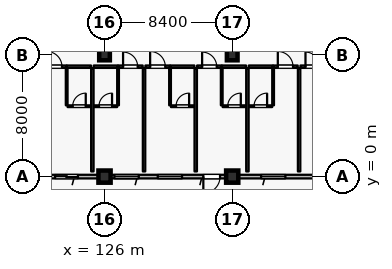
"""IFC4 building model, lengths in metres.
Left out: names, types, materials, properties, quantities, classifications, styles, units other than length and angle.
Written with IfcOpenShell. Run it as: python <this file> out.ifc"""

import sys

from ifc_helpers import new_model, si_unit, direction, frame, frame_2d, origin, origin_2d, place, context, subcontext, project, spatial, rectangle, extrude, element, fill, save


model = new_model("IFC4")
c1 = context("Model", 3, precision=1e-05, world=origin(), true_north=direction((0.0, 1.0)))
c2 = subcontext(c1, "Body", "Model", "MODEL_VIEW")
j1 = project(units=[si_unit("LENGTHUNIT", "METRE"), si_unit("PLANEANGLEUNIT", "RADIAN")], contexts=[c1])
p1 = place(None, origin())
s1 = spatial("IfcSite", under=j1, at=p1, CompositionType="ELEMENT")
p2 = place(p1, origin())
s2 = spatial("IfcBuilding", under=s1, at=p2, CompositionType="ELEMENT")
p3 = place(p2, frame((0.0, 0.0, 21.0)))
s3 = spatial("IfcBuildingStorey", under=s2, at=p3, CompositionType="ELEMENT", Elevation=21.0)
for number, where, z_axis, x_axis in (
    (1, (126.0, 0.0, 0.0), (0.0, 0.0, 1.0), (1.0, 0.0, 0.0)),
    (2, (134.4, 0.0, 0.0), (0.0, 0.0, 1.0), (1.0, 0.0, 0.0)),
):
    element("IfcColumn", number, at=place(p3, frame(where, z_axis=z_axis, x_axis=x_axis)), inside=s3, PredefinedType="COLUMN", context=c2, shape_type="SweptSolid", body=[
        extrude(rectangle(XDim=0.8, YDim=0.8, at=origin_2d()), origin(), (0.0, 0.0, 1.0), 4.2),
    ])
for number, where, z_axis, x_axis in (
    (3, (126.0, 8.0, 0.0), (0.0, 0.0, 1.0), (1.0, 0.0, 0.0)),
    (4, (134.4, 8.0, 0.0), (0.0, 0.0, 1.0), (1.0, 0.0, 0.0)),
):
    element("IfcColumn", number, at=place(p3, frame(where, z_axis=z_axis, x_axis=x_axis)), inside=s3, PredefinedType="COLUMN", context=c2, shape_type="SweptSolid", body=[
        extrude(rectangle(XDim=0.7, YDim=0.7, at=origin_2d()), origin(), (0.0, 0.0, 1.0), 4.2),
    ])
p4 = place(p3, frame((125.6, 0.0, 0.0), z_axis=(0.0, 0.0, 1.0), x_axis=(-1.0, 0.0, 0.0)))
e5 = element("IfcWall", 5, at=p4, inside=s3, PredefinedType="SOLIDWALL", context=c2, shape_type="SweptSolid", body=[
    extrude(rectangle(XDim=7.6, YDim=0.24, at=frame_2d((3.8, 0.0))), origin(), (0.0, 0.0, 1.0), 3.53),
])
p5 = place(p4, frame((1.35, 0.0, 0.0)))
e6 = element("IfcOpeningElement", 6, at=p5, cuts=e5, PredefinedType="OPENING", context=c2, shape_type="SweptSolid", body=[
    extrude(rectangle(XDim=1.5, YDim=2.25, at=frame_2d((0.75, 1.125))), frame((0.0, 0.13, 0.0), z_axis=(0.0, -1.0, 0.0), x_axis=(1.0, 0.0, 0.0)), (0.0, 0.0, 1.0), 0.26),
])
p6 = place(p4, frame((4.7, 0.0, 0.8)))
e7 = element("IfcOpeningElement", 7, at=p6, cuts=e5, PredefinedType="OPENING", context=c2, shape_type="SweptSolid", body=[
    extrude(rectangle(XDim=1.6, YDim=1.6, at=frame_2d((0.8, 0.8))), frame((0.0, 0.13, 0.0), z_axis=(0.0, -1.0, 0.0), x_axis=(1.0, 0.0, 0.0)), (0.0, 0.0, 1.0), 0.26),
])
p7 = place(p3, frame((134.0, 0.0, 0.0), z_axis=(0.0, 0.0, 1.0), x_axis=(-1.0, 0.0, 0.0)))
e8 = element("IfcWall", 8, at=p7, inside=s3, PredefinedType="SOLIDWALL", context=c2, shape_type="SweptSolid", body=[
    extrude(rectangle(XDim=7.6, YDim=0.24, at=frame_2d((3.8, 0.0))), origin(), (0.0, 0.0, 1.0), 3.53),
])
p8 = place(p7, frame((0.4, 0.0, 0.0)))
e9 = element("IfcOpeningElement", 9, at=p8, cuts=e8, PredefinedType="OPENING", context=c2, shape_type="SweptSolid", body=[
    extrude(rectangle(XDim=1.1, YDim=2.2, at=frame_2d((0.55, 1.1))), frame((0.0, 0.13, 0.0), z_axis=(0.0, -1.0, 0.0), x_axis=(1.0, 0.0, 0.0)), (0.0, 0.0, 1.0), 0.26),
])
p9 = place(p7, frame((2.9, 0.0, 0.8)))
e10 = element("IfcOpeningElement", 10, at=p9, cuts=e8, PredefinedType="OPENING", context=c2, shape_type="SweptSolid", body=[
    extrude(rectangle(XDim=1.6, YDim=1.6, at=frame_2d((0.8, 0.8))), frame((0.0, 0.13, 0.0), z_axis=(0.0, -1.0, 0.0), x_axis=(1.0, 0.0, 0.0)), (0.0, 0.0, 1.0), 0.26),
])
p10 = place(p7, frame((5.75, 0.0, 0.8)))
e11 = element("IfcOpeningElement", 11, at=p10, cuts=e8, PredefinedType="OPENING", context=c2, shape_type="SweptSolid", body=[
    extrude(rectangle(XDim=1.6, YDim=1.6, at=frame_2d((0.8, 0.8))), frame((0.0, 0.13, 0.0), z_axis=(0.0, -1.0, 0.0), x_axis=(1.0, 0.0, 0.0)), (0.0, 0.0, 1.0), 0.26),
])
p11 = place(p3, frame((142.4, 0.0, 0.0), z_axis=(0.0, 0.0, 1.0), x_axis=(-1.0, 0.0, 0.0)))
e12 = element("IfcWall", 12, at=p11, inside=s3, PredefinedType="SOLIDWALL", context=c2, shape_type="SweptSolid", body=[
    extrude(rectangle(XDim=7.6, YDim=0.24, at=frame_2d((3.8, 0.0))), origin(), (0.0, 0.0, 1.0), 3.53),
])
p12 = place(p11, frame((1.15, 0.0, 0.0)))
e13 = element("IfcOpeningElement", 13, at=p12, cuts=e12, PredefinedType="OPENING", context=c2, shape_type="SweptSolid", body=[
    extrude(rectangle(XDim=1.5, YDim=2.25, at=frame_2d((0.75, 1.125))), frame((0.0, 0.13, 0.0), z_axis=(0.0, -1.0, 0.0), x_axis=(1.0, 0.0, 0.0)), (0.0, 0.0, 1.0), 0.26),
])
p13 = place(p11, frame((4.5, 0.0, 0.8)))
e14 = element("IfcOpeningElement", 14, at=p13, cuts=e12, PredefinedType="OPENING", context=c2, shape_type="SweptSolid", body=[
    extrude(rectangle(XDim=1.6, YDim=1.6, at=frame_2d((0.8, 0.8))), frame((0.0, 0.13, 0.0), z_axis=(0.0, -1.0, 0.0), x_axis=(1.0, 0.0, 0.0)), (0.0, 0.0, 1.0), 0.26),
])
p14 = place(p3, frame((121.89, 7.23, 0.0), z_axis=(0.0, 0.0, 1.0), x_axis=(1.0, 0.0, 0.0)))
e15 = element("IfcWall", 15, at=p14, inside=s3, PredefinedType="PARTITIONING", context=c2, shape_type="SweptSolid", body=[
    extrude(rectangle(XDim=1.62, YDim=0.16, at=frame_2d((0.81, 0.0))), origin(), (0.0, 0.0, 1.0), 3.965),
])
p15 = place(p14, frame((0.31, 0.0, 0.0)))
e16 = element("IfcOpeningElement", 16, at=p15, cuts=e15, PredefinedType="OPENING", context=c2, shape_type="SweptSolid", body=[
    extrude(rectangle(XDim=1.0, YDim=2.25, at=frame_2d((0.5, 1.125))), frame((0.0, 0.09, 0.0), z_axis=(0.0, -1.0, 0.0), x_axis=(1.0, 0.0, 0.0)), (0.0, 0.0, 1.0), 0.18),
])
p16 = place(p3, frame((123.52, 7.23, 0.0), z_axis=(0.0, 0.0, 1.0), x_axis=(1.0, 0.0, 0.0)))
e17 = element("IfcWall", 17, at=p16, inside=s3, PredefinedType="PARTITIONING", context=c2, shape_type="SweptSolid", body=[
    extrude(rectangle(XDim=1.59, YDim=0.16, at=frame_2d((0.795, 0.0))), origin(), (0.0, 0.0, 1.0), 3.965),
])
p17 = place(p3, frame((123.51, 4.69, 0.0), z_axis=(0.0, 0.0, 1.0), x_axis=(0.0, 1.0, 0.0)))
e18 = element("IfcWall", 18, at=p17, inside=s3, PredefinedType="PARTITIONING", context=c2, shape_type="SweptSolid", body=[
    extrude(rectangle(XDim=2.45, YDim=0.115, at=frame_2d((1.225, 0.0))), origin(), (0.0, 0.0, 1.0), 3.965),
])
p18 = place(p3, frame((123.57, 4.63, 0.0), z_axis=(0.0, 0.0, 1.0), x_axis=(1.0, 0.0, 0.0)))
e19 = element("IfcWall", 19, at=p18, inside=s3, PredefinedType="PARTITIONING", context=c2, shape_type="SweptSolid", body=[
    extrude(rectangle(XDim=1.53, YDim=0.115, at=frame_2d((0.765, 0.0))), origin(), (0.0, 0.0, 1.0), 3.965),
])
p19 = place(p18, frame((0.335, 0.0, 0.0)))
e20 = element("IfcOpeningElement", 20, at=p19, cuts=e19, PredefinedType="OPENING", context=c2, shape_type="SweptSolid", body=[
    extrude(rectangle(XDim=0.86, YDim=2.12, at=frame_2d((0.43, 1.06))), frame((0.0, 0.067, 0.0), z_axis=(0.0, -1.0, 0.0), x_axis=(1.0, 0.0, 0.0)), (0.0, 0.0, 1.0), 0.135),
])
p20 = place(p3, frame((125.29, 7.23, 0.0), z_axis=(0.0, 0.0, 1.0), x_axis=(1.0, 0.0, 0.0)))
e21 = element("IfcWall", 21, at=p20, inside=s3, PredefinedType="PARTITIONING", context=c2, shape_type="SweptSolid", body=[
    extrude(rectangle(XDim=1.59, YDim=0.16, at=frame_2d((0.795, 0.0))), origin(), (0.0, 0.0, 1.0), 3.965),
])
p21 = place(p3, frame((126.89, 7.23, 0.0), z_axis=(0.0, 0.0, 1.0), x_axis=(1.0, 0.0, 0.0)))
e22 = element("IfcWall", 22, at=p21, inside=s3, PredefinedType="PARTITIONING", context=c2, shape_type="SweptSolid", body=[
    extrude(rectangle(XDim=1.62, YDim=0.16, at=frame_2d((0.81, 0.0))), origin(), (0.0, 0.0, 1.0), 3.965),
])
p22 = place(p21, frame((0.33, 0.0, 0.0)))
e23 = element("IfcOpeningElement", 23, at=p22, cuts=e22, PredefinedType="OPENING", context=c2, shape_type="SweptSolid", body=[
    extrude(rectangle(XDim=0.96, YDim=2.2, at=frame_2d((0.48, 1.1))), frame((0.0, 0.09, 0.0), z_axis=(0.0, -1.0, 0.0), x_axis=(1.0, 0.0, 0.0)), (0.0, 0.0, 1.0), 0.18),
])
p23 = place(p3, frame((126.89, 4.69, 0.0), z_axis=(0.0, 0.0, 1.0), x_axis=(0.0, 1.0, 0.0)))
e24 = element("IfcWall", 24, at=p23, inside=s3, PredefinedType="PARTITIONING", context=c2, shape_type="SweptSolid", body=[
    extrude(rectangle(XDim=2.45, YDim=0.115, at=frame_2d((1.225, 0.0))), origin(), (0.0, 0.0, 1.0), 3.965),
])
p24 = place(p3, frame((125.3, 4.63, 0.0), z_axis=(0.0, 0.0, 1.0), x_axis=(1.0, 0.0, 0.0)))
e25 = element("IfcWall", 25, at=p24, inside=s3, PredefinedType="PARTITIONING", context=c2, shape_type="SweptSolid", body=[
    extrude(rectangle(XDim=1.53, YDim=0.115, at=frame_2d((0.765, 0.0))), origin(), (0.0, 0.0, 1.0), 3.965),
])
p25 = place(p24, frame((0.335, 0.0, 0.0)))
e26 = element("IfcOpeningElement", 26, at=p25, cuts=e25, PredefinedType="OPENING", context=c2, shape_type="SweptSolid", body=[
    extrude(rectangle(XDim=0.86, YDim=2.12, at=frame_2d((0.43, 1.06))), frame((0.0, 0.067, 0.0), z_axis=(0.0, -1.0, 0.0), x_axis=(1.0, 0.0, 0.0)), (0.0, 0.0, 1.0), 0.135),
])
p26 = place(p3, frame((125.2, 0.34, 0.0), z_axis=(0.0, 0.0, 1.0), x_axis=(0.0, 1.0, 0.0)))
e27 = element("IfcWall", 27, at=p26, inside=s3, PredefinedType="PARTITIONING", context=c2, shape_type="SweptSolid", body=[
    extrude(rectangle(XDim=6.8, YDim=0.16, at=frame_2d((3.4, 0.0))), origin(), (0.0, 0.0, 1.0), 3.965),
])
p27 = place(p3, frame((128.69, 7.23, 0.0), z_axis=(0.0, 0.0, 1.0), x_axis=(1.0, 0.0, 0.0)))
e28 = element("IfcWall", 28, at=p27, inside=s3, PredefinedType="PARTITIONING", context=c2, shape_type="SweptSolid", body=[
    extrude(rectangle(XDim=1.62, YDim=0.16, at=frame_2d((0.81, 0.0))), origin(), (0.0, 0.0, 1.0), 3.965),
])
p28 = place(p27, frame((0.31, 0.0, 0.0)))
e29 = element("IfcOpeningElement", 29, at=p28, cuts=e28, PredefinedType="OPENING", context=c2, shape_type="SweptSolid", body=[
    extrude(rectangle(XDim=1.0, YDim=2.25, at=frame_2d((0.5, 1.125))), frame((0.0, 0.09, 0.0), z_axis=(0.0, -1.0, 0.0), x_axis=(1.0, 0.0, 0.0)), (0.0, 0.0, 1.0), 0.18),
])
p29 = place(p3, frame((130.32, 7.23, 0.0), z_axis=(0.0, 0.0, 1.0), x_axis=(1.0, 0.0, 0.0)))
e30 = element("IfcWall", 30, at=p29, inside=s3, PredefinedType="PARTITIONING", context=c2, shape_type="SweptSolid", body=[
    extrude(rectangle(XDim=1.59, YDim=0.16, at=frame_2d((0.795, 0.0))), origin(), (0.0, 0.0, 1.0), 3.965),
])
p30 = place(p3, frame((130.31, 4.69, 0.0), z_axis=(0.0, 0.0, 1.0), x_axis=(0.0, 1.0, 0.0)))
e31 = element("IfcWall", 31, at=p30, inside=s3, PredefinedType="PARTITIONING", context=c2, shape_type="SweptSolid", body=[
    extrude(rectangle(XDim=2.45, YDim=0.115, at=frame_2d((1.225, 0.0))), origin(), (0.0, 0.0, 1.0), 3.965),
])
p31 = place(p3, frame((130.37, 4.63, 0.0), z_axis=(0.0, 0.0, 1.0), x_axis=(1.0, 0.0, 0.0)))
e32 = element("IfcWall", 32, at=p31, inside=s3, PredefinedType="PARTITIONING", context=c2, shape_type="SweptSolid", body=[
    extrude(rectangle(XDim=1.53, YDim=0.115, at=frame_2d((0.765, 0.0))), origin(), (0.0, 0.0, 1.0), 3.965),
])
p32 = place(p31, frame((0.335, 0.0, 0.0)))
e33 = element("IfcOpeningElement", 33, at=p32, cuts=e32, PredefinedType="OPENING", context=c2, shape_type="SweptSolid", body=[
    extrude(rectangle(XDim=0.86, YDim=2.12, at=frame_2d((0.43, 1.06))), frame((0.0, 0.067, 0.0), z_axis=(0.0, -1.0, 0.0), x_axis=(1.0, 0.0, 0.0)), (0.0, 0.0, 1.0), 0.135),
])
p33 = place(p3, frame((128.6, 0.34, 0.0), z_axis=(0.0, 0.0, 1.0), x_axis=(0.0, 1.0, 0.0)))
e34 = element("IfcWall", 34, at=p33, inside=s3, PredefinedType="PARTITIONING", context=c2, shape_type="SweptSolid", body=[
    extrude(rectangle(XDim=6.8, YDim=0.16, at=frame_2d((3.4, 0.0))), origin(), (0.0, 0.0, 1.0), 3.965),
])
p34 = place(p3, frame((132.09, 7.23, 0.0), z_axis=(0.0, 0.0, 1.0), x_axis=(1.0, 0.0, 0.0)))
e35 = element("IfcWall", 35, at=p34, inside=s3, PredefinedType="PARTITIONING", context=c2, shape_type="SweptSolid", body=[
    extrude(rectangle(XDim=1.62, YDim=0.16, at=frame_2d((0.81, 0.0))), origin(), (0.0, 0.0, 1.0), 3.965),
])
p35 = place(p34, frame((0.33, 0.0, 0.0)))
e36 = element("IfcOpeningElement", 36, at=p35, cuts=e35, PredefinedType="OPENING", context=c2, shape_type="SweptSolid", body=[
    extrude(rectangle(XDim=0.96, YDim=2.2, at=frame_2d((0.48, 1.1))), frame((0.0, 0.09, 0.0), z_axis=(0.0, -1.0, 0.0), x_axis=(1.0, 0.0, 0.0)), (0.0, 0.0, 1.0), 0.18),
])
p36 = place(p3, frame((133.72, 7.23, 0.0), z_axis=(0.0, 0.0, 1.0), x_axis=(1.0, 0.0, 0.0)))
e37 = element("IfcWall", 37, at=p36, inside=s3, PredefinedType="PARTITIONING", context=c2, shape_type="SweptSolid", body=[
    extrude(rectangle(XDim=1.59, YDim=0.16, at=frame_2d((0.795, 0.0))), origin(), (0.0, 0.0, 1.0), 3.965),
])
p37 = place(p3, frame((133.71, 4.69, 0.0), z_axis=(0.0, 0.0, 1.0), x_axis=(0.0, 1.0, 0.0)))
e38 = element("IfcWall", 38, at=p37, inside=s3, PredefinedType="PARTITIONING", context=c2, shape_type="SweptSolid", body=[
    extrude(rectangle(XDim=2.45, YDim=0.115, at=frame_2d((1.225, 0.0))), origin(), (0.0, 0.0, 1.0), 3.965),
])
p38 = place(p3, frame((133.77, 4.63, 0.0), z_axis=(0.0, 0.0, 1.0), x_axis=(1.0, 0.0, 0.0)))
e39 = element("IfcWall", 39, at=p38, inside=s3, PredefinedType="PARTITIONING", context=c2, shape_type="SweptSolid", body=[
    extrude(rectangle(XDim=1.53, YDim=0.115, at=frame_2d((0.765, 0.0))), origin(), (0.0, 0.0, 1.0), 3.965),
])
p39 = place(p38, frame((0.335, 0.0, 0.0)))
e40 = element("IfcOpeningElement", 40, at=p39, cuts=e39, PredefinedType="OPENING", context=c2, shape_type="SweptSolid", body=[
    extrude(rectangle(XDim=0.86, YDim=2.12, at=frame_2d((0.43, 1.06))), frame((0.0, 0.067, 0.0), z_axis=(0.0, -1.0, 0.0), x_axis=(1.0, 0.0, 0.0)), (0.0, 0.0, 1.0), 0.135),
])
p40 = place(p3, frame((132.0, 0.34, 0.0), z_axis=(0.0, 0.0, 1.0), x_axis=(0.0, 1.0, 0.0)))
e41 = element("IfcWall", 41, at=p40, inside=s3, PredefinedType="PARTITIONING", context=c2, shape_type="SweptSolid", body=[
    extrude(rectangle(XDim=6.8, YDim=0.16, at=frame_2d((3.4, 0.0))), origin(), (0.0, 0.0, 1.0), 3.965),
])
p41 = place(p3, frame((135.49, 7.23, 0.0), z_axis=(0.0, 0.0, 1.0), x_axis=(1.0, 0.0, 0.0)))
e42 = element("IfcWall", 42, at=p41, inside=s3, PredefinedType="PARTITIONING", context=c2, shape_type="SweptSolid", body=[
    extrude(rectangle(XDim=1.59, YDim=0.16, at=frame_2d((0.795, 0.0))), origin(), (0.0, 0.0, 1.0), 3.965),
])
p42 = place(p3, frame((137.09, 7.23, 0.0), z_axis=(0.0, 0.0, 1.0), x_axis=(1.0, 0.0, 0.0)))
e43 = element("IfcWall", 43, at=p42, inside=s3, PredefinedType="PARTITIONING", context=c2, shape_type="SweptSolid", body=[
    extrude(rectangle(XDim=1.62, YDim=0.16, at=frame_2d((0.81, 0.0))), origin(), (0.0, 0.0, 1.0), 3.965),
])
p43 = place(p42, frame((0.31, 0.0, 0.0)))
e44 = element("IfcOpeningElement", 44, at=p43, cuts=e43, PredefinedType="OPENING", context=c2, shape_type="SweptSolid", body=[
    extrude(rectangle(XDim=1.0, YDim=2.25, at=frame_2d((0.5, 1.125))), frame((0.0, 0.09, 0.0), z_axis=(0.0, -1.0, 0.0), x_axis=(1.0, 0.0, 0.0)), (0.0, 0.0, 1.0), 0.18),
])
p44 = place(p3, frame((137.09, 4.69, 0.0), z_axis=(0.0, 0.0, 1.0), x_axis=(0.0, 1.0, 0.0)))
e45 = element("IfcWall", 45, at=p44, inside=s3, PredefinedType="PARTITIONING", context=c2, shape_type="SweptSolid", body=[
    extrude(rectangle(XDim=2.45, YDim=0.115, at=frame_2d((1.225, 0.0))), origin(), (0.0, 0.0, 1.0), 3.965),
])
p45 = place(p3, frame((135.5, 4.63, 0.0), z_axis=(0.0, 0.0, 1.0), x_axis=(1.0, 0.0, 0.0)))
e46 = element("IfcWall", 46, at=p45, inside=s3, PredefinedType="PARTITIONING", context=c2, shape_type="SweptSolid", body=[
    extrude(rectangle(XDim=1.53, YDim=0.115, at=frame_2d((0.765, 0.0))), origin(), (0.0, 0.0, 1.0), 3.965),
])
p46 = place(p45, frame((0.335, 0.0, 0.0)))
e47 = element("IfcOpeningElement", 47, at=p46, cuts=e46, PredefinedType="OPENING", context=c2, shape_type="SweptSolid", body=[
    extrude(rectangle(XDim=0.86, YDim=2.12, at=frame_2d((0.43, 1.06))), frame((0.0, 0.067, 0.0), z_axis=(0.0, -1.0, 0.0), x_axis=(1.0, 0.0, 0.0)), (0.0, 0.0, 1.0), 0.135),
])
p47 = place(p3, frame((135.4, 0.34, 0.0), z_axis=(0.0, 0.0, 1.0), x_axis=(0.0, 1.0, 0.0)))
e48 = element("IfcWall", 48, at=p47, inside=s3, PredefinedType="PARTITIONING", context=c2, shape_type="SweptSolid", body=[
    extrude(rectangle(XDim=6.8, YDim=0.16, at=frame_2d((3.4, 0.0))), origin(), (0.0, 0.0, 1.0), 3.965),
])
p48 = place(p3, frame((138.89, 7.23, 0.0), z_axis=(0.0, 0.0, 1.0), x_axis=(1.0, 0.0, 0.0)))
e49 = element("IfcWall", 49, at=p48, inside=s3, PredefinedType="PARTITIONING", context=c2, shape_type="SweptSolid", body=[
    extrude(rectangle(XDim=1.62, YDim=0.16, at=frame_2d((0.81, 0.0))), origin(), (0.0, 0.0, 1.0), 3.965),
])
p49 = place(p48, frame((0.33, 0.0, 0.0)))
e50 = element("IfcOpeningElement", 50, at=p49, cuts=e49, PredefinedType="OPENING", context=c2, shape_type="SweptSolid", body=[
    extrude(rectangle(XDim=0.96, YDim=2.2, at=frame_2d((0.48, 1.1))), frame((0.0, 0.09, 0.0), z_axis=(0.0, -1.0, 0.0), x_axis=(1.0, 0.0, 0.0)), (0.0, 0.0, 1.0), 0.18),
])
p50 = place(p3, frame((138.8, 0.34, 0.0), z_axis=(0.0, 0.0, 1.0), x_axis=(0.0, 1.0, 0.0)))
e51 = element("IfcWall", 51, at=p50, inside=s3, PredefinedType="PARTITIONING", context=c2, shape_type="SweptSolid", body=[
    extrude(rectangle(XDim=6.8, YDim=0.16, at=frame_2d((3.4, 0.0))), origin(), (0.0, 0.0, 1.0), 3.965),
])
p51 = place(p5, origin())
e52 = element("IfcDoor", 52, at=p51, inside=s3, OperationType="SLIDING_TO_LEFT", PredefinedType="DOOR", context=c2, shape_type="SweptSolid", body=[
    extrude(rectangle(XDim=1.5, YDim=2.25, at=frame_2d((0.75, 1.125))), frame((0.0, 0.025, 0.0), z_axis=(0.0, -1.0, 0.0), x_axis=(1.0, 0.0, 0.0)), (0.0, 0.0, 1.0), 0.05),
])
fill(e6, e52)
p52 = place(p8, origin())
e53 = element("IfcDoor", 53, at=p52, inside=s3, OperationType="SINGLE_SWING_RIGHT", PredefinedType="DOOR", context=c2, shape_type="SweptSolid", body=[
    extrude(rectangle(XDim=1.1, YDim=2.2, at=frame_2d((0.55, 1.1))), frame((0.0, 0.025, 0.0), z_axis=(0.0, -1.0, 0.0), x_axis=(1.0, 0.0, 0.0)), (0.0, 0.0, 1.0), 0.05),
])
fill(e9, e53)
p53 = place(p9, origin())
e54 = element("IfcWindow", 54, at=p53, inside=s3, PartitioningType="SINGLE_PANEL", PredefinedType="WINDOW", context=c2, shape_type="SweptSolid", body=[
    extrude(rectangle(XDim=1.6, YDim=1.6, at=frame_2d((0.8, 0.8))), frame((0.0, 0.03, 0.0), z_axis=(0.0, -1.0, 0.0), x_axis=(1.0, 0.0, 0.0)), (0.0, 0.0, 1.0), 0.06),
])
fill(e10, e54)
p54 = place(p10, origin())
e55 = element("IfcWindow", 55, at=p54, inside=s3, PartitioningType="SINGLE_PANEL", PredefinedType="WINDOW", context=c2, shape_type="SweptSolid", body=[
    extrude(rectangle(XDim=1.6, YDim=1.6, at=frame_2d((0.8, 0.8))), frame((0.0, 0.03, 0.0), z_axis=(0.0, -1.0, 0.0), x_axis=(1.0, 0.0, 0.0)), (0.0, 0.0, 1.0), 0.06),
])
fill(e11, e55)
p55 = place(p13, origin())
e56 = element("IfcWindow", 56, at=p55, inside=s3, PartitioningType="SINGLE_PANEL", PredefinedType="WINDOW", context=c2, shape_type="SweptSolid", body=[
    extrude(rectangle(XDim=1.6, YDim=1.6, at=frame_2d((0.8, 0.8))), frame((0.0, 0.03, 0.0), z_axis=(0.0, -1.0, 0.0), x_axis=(1.0, 0.0, 0.0)), (0.0, 0.0, 1.0), 0.06),
])
fill(e14, e56)
p56 = place(p15, origin())
e57 = element("IfcDoor", 57, at=p56, inside=s3, OperationType="SINGLE_SWING_LEFT", PredefinedType="DOOR", context=c2, shape_type="SweptSolid", body=[
    extrude(rectangle(XDim=1.0, YDim=2.25, at=frame_2d((0.5, 1.125))), frame((0.0, 0.025, 0.0), z_axis=(0.0, -1.0, 0.0), x_axis=(1.0, 0.0, 0.0)), (0.0, 0.0, 1.0), 0.05),
])
fill(e16, e57)
p57 = place(p19, origin())
e58 = element("IfcDoor", 58, at=p57, inside=s3, OperationType="SINGLE_SWING_RIGHT", PredefinedType="DOOR", context=c2, shape_type="SweptSolid", body=[
    extrude(rectangle(XDim=0.86, YDim=2.12, at=frame_2d((0.43, 1.06))), frame((0.0, 0.025, 0.0), z_axis=(0.0, -1.0, 0.0), x_axis=(1.0, 0.0, 0.0)), (0.0, 0.0, 1.0), 0.05),
])
fill(e20, e58)
p58 = place(p22, origin())
e59 = element("IfcDoor", 59, at=p58, inside=s3, OperationType="SINGLE_SWING_LEFT", PredefinedType="DOOR", context=c2, shape_type="SweptSolid", body=[
    extrude(rectangle(XDim=0.96, YDim=2.2, at=frame_2d((0.48, 1.1))), frame((0.0, 0.025, 0.0), z_axis=(0.0, -1.0, 0.0), x_axis=(1.0, 0.0, 0.0)), (0.0, 0.0, 1.0), 0.05),
])
fill(e23, e59)
p59 = place(p25, origin())
e60 = element("IfcDoor", 60, at=p59, inside=s3, OperationType="SINGLE_SWING_RIGHT", PredefinedType="DOOR", context=c2, shape_type="SweptSolid", body=[
    extrude(rectangle(XDim=0.86, YDim=2.12, at=frame_2d((0.43, 1.06))), frame((0.0, 0.025, 0.0), z_axis=(0.0, -1.0, 0.0), x_axis=(1.0, 0.0, 0.0)), (0.0, 0.0, 1.0), 0.05),
])
fill(e26, e60)
p60 = place(p28, origin())
e61 = element("IfcDoor", 61, at=p60, inside=s3, OperationType="SINGLE_SWING_LEFT", PredefinedType="DOOR", context=c2, shape_type="SweptSolid", body=[
    extrude(rectangle(XDim=1.0, YDim=2.25, at=frame_2d((0.5, 1.125))), frame((0.0, 0.025, 0.0), z_axis=(0.0, -1.0, 0.0), x_axis=(1.0, 0.0, 0.0)), (0.0, 0.0, 1.0), 0.05),
])
fill(e29, e61)
p61 = place(p32, origin())
e62 = element("IfcDoor", 62, at=p61, inside=s3, OperationType="SINGLE_SWING_RIGHT", PredefinedType="DOOR", context=c2, shape_type="SweptSolid", body=[
    extrude(rectangle(XDim=0.86, YDim=2.12, at=frame_2d((0.43, 1.06))), frame((0.0, 0.025, 0.0), z_axis=(0.0, -1.0, 0.0), x_axis=(1.0, 0.0, 0.0)), (0.0, 0.0, 1.0), 0.05),
])
fill(e33, e62)
p62 = place(p35, origin())
e63 = element("IfcDoor", 63, at=p62, inside=s3, OperationType="SINGLE_SWING_LEFT", PredefinedType="DOOR", context=c2, shape_type="SweptSolid", body=[
    extrude(rectangle(XDim=0.96, YDim=2.2, at=frame_2d((0.48, 1.1))), frame((0.0, 0.025, 0.0), z_axis=(0.0, -1.0, 0.0), x_axis=(1.0, 0.0, 0.0)), (0.0, 0.0, 1.0), 0.05),
])
fill(e36, e63)
p63 = place(p39, origin())
e64 = element("IfcDoor", 64, at=p63, inside=s3, OperationType="SINGLE_SWING_RIGHT", PredefinedType="DOOR", context=c2, shape_type="SweptSolid", body=[
    extrude(rectangle(XDim=0.86, YDim=2.12, at=frame_2d((0.43, 1.06))), frame((0.0, 0.025, 0.0), z_axis=(0.0, -1.0, 0.0), x_axis=(1.0, 0.0, 0.0)), (0.0, 0.0, 1.0), 0.05),
])
fill(e40, e64)
p64 = place(p43, origin())
e65 = element("IfcDoor", 65, at=p64, inside=s3, OperationType="SINGLE_SWING_LEFT", PredefinedType="DOOR", context=c2, shape_type="SweptSolid", body=[
    extrude(rectangle(XDim=1.0, YDim=2.25, at=frame_2d((0.5, 1.125))), frame((0.0, 0.025, 0.0), z_axis=(0.0, -1.0, 0.0), x_axis=(1.0, 0.0, 0.0)), (0.0, 0.0, 1.0), 0.05),
])
fill(e44, e65)
p65 = place(p46, origin())
e66 = element("IfcDoor", 66, at=p65, inside=s3, OperationType="SINGLE_SWING_RIGHT", PredefinedType="DOOR", context=c2, shape_type="SweptSolid", body=[
    extrude(rectangle(XDim=0.86, YDim=2.12, at=frame_2d((0.43, 1.06))), frame((0.0, 0.025, 0.0), z_axis=(0.0, -1.0, 0.0), x_axis=(1.0, 0.0, 0.0)), (0.0, 0.0, 1.0), 0.05),
])
fill(e47, e66)
p66 = place(p49, origin())
e67 = element("IfcDoor", 67, at=p66, inside=s3, OperationType="SINGLE_SWING_LEFT", PredefinedType="DOOR", context=c2, shape_type="SweptSolid", body=[
    extrude(rectangle(XDim=0.96, YDim=2.2, at=frame_2d((0.48, 1.1))), frame((0.0, 0.025, 0.0), z_axis=(0.0, -1.0, 0.0), x_axis=(1.0, 0.0, 0.0)), (0.0, 0.0, 1.0), 0.05),
])
fill(e50, e67)
save(model, sys.argv[1])
